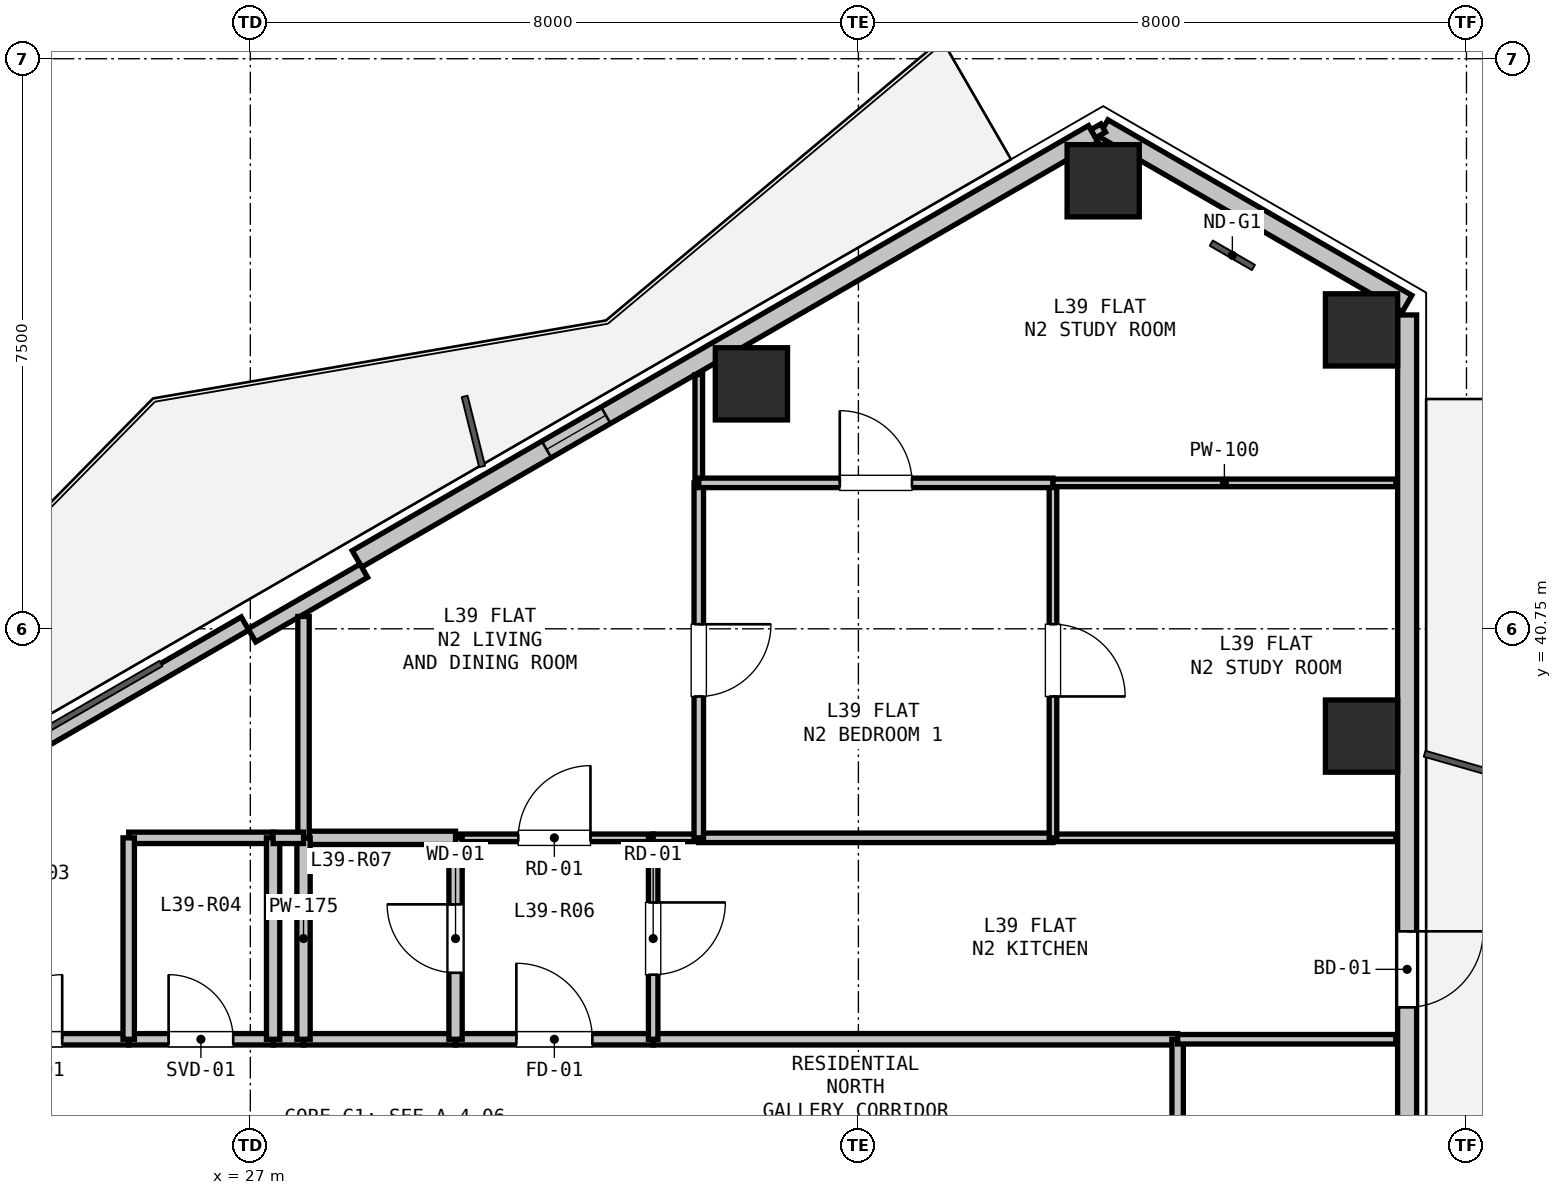
"""IFC4 building model, lengths in metres.
Left out: names, types, materials, properties, quantities, classifications, styles, units other than length and angle.
Written with IfcOpenShell. Run it as: python <this file> out.ifc"""

import sys

from ifc_helpers import new_model, si_unit, direction, frame, frame_2d, origin, origin_2d, place, context, subcontext, project, spatial, rectangle, hollow_rectangle, extrude, element, fill, save


model = new_model("IFC4")
c1 = context("Model", 3, precision=1e-05, world=origin(), true_north=direction((0.0, 1.0)))
c2 = subcontext(c1, "Body", "Model", "MODEL_VIEW")
j1 = project(units=[si_unit("LENGTHUNIT", "METRE"), si_unit("PLANEANGLEUNIT", "RADIAN")], contexts=[c1])
p1 = place(None, origin())
s1 = spatial("IfcSite", under=j1, at=p1, CompositionType="ELEMENT")
p2 = place(p1, origin())
s2 = spatial("IfcBuilding", under=s1, at=p2, CompositionType="ELEMENT")
p3 = place(p2, frame((0.0, 0.0, 141.0)))
s3 = spatial("IfcBuildingStorey", under=s2, at=p3, CompositionType="ELEMENT", Elevation=141.0)
for number, where, z_axis, x_axis in (
    (1, (33.593, 43.973, 0.0), (0.0, 0.0, 1.0), (1.0, 0.0, 0.0)),
    (2, (38.22, 46.645, 0.0), (0.0, 0.0, 1.0), (1.0, 0.0, 0.0)),
    (3, (41.619, 44.683, 0.0), (0.0, 0.0, 1.0), (1.0, 0.0, 0.0)),
    (4, (41.619, 39.339, 0.0), (0.0, 0.0, 1.0), (1.0, 0.0, 0.0)),
):
    element("IfcColumn", number, at=place(p3, frame(where, z_axis=z_axis, x_axis=x_axis)), inside=s3, PredefinedType="COLUMN", context=c2, shape_type="SweptSolid", body=[
        extrude(hollow_rectangle(XDim=0.95, YDim=0.95, WallThickness=0.028, at=origin_2d()), origin(), (0.0, 0.0, 1.0), 3.3),
    ])
p4 = place(p3, frame((38.22, 47.338, 0.0), z_axis=(0.0, 0.0, 1.0), x_axis=(0.866035021055, -0.499983342029, 0.0)))
e5 = element("IfcWall", 5, at=p4, inside=s3, PredefinedType="SOLIDWALL", context=c2, shape_type="SweptSolid", body=[
    extrude(rectangle(XDim=4.617, YDim=0.25, at=frame_2d((2.309, 0.0))), origin(), (0.0, 0.0, 1.0), 2.68),
])
p5 = place(p3, frame((17.85, 35.577, 0.0), z_axis=(0.0, 0.0, 1.0), x_axis=(0.866026619769, 0.499997893847, 0.0)))
e6 = element("IfcWall", 6, at=p5, inside=s3, PredefinedType="PARAPET", context=c2, shape_type="SweptSolid", body=[
    extrude(rectangle(XDim=10.486, YDim=0.2, at=frame_2d((5.243, 0.0))), origin(), (0.0, 0.0, 1.0), 0.2),
])
p6 = place(p3, frame((28.403, 41.67, 0.0), z_axis=(0.0, 0.0, 1.0), x_axis=(0.86602239209, 0.500005216371, 0.0)))
e7 = element("IfcWall", 7, at=p6, inside=s3, PredefinedType="SOLIDWALL", context=c2, shape_type="SweptSolid", body=[
    extrude(rectangle(XDim=11.186, YDim=0.25, at=frame_2d((5.593, 0.0))), origin(), (0.0, 0.0, 1.0), 2.68),
])
p7 = place(p6, frame((2.88, 0.0, 0.9)))
e8 = element("IfcOpeningElement", 8, at=p7, cuts=e7, PredefinedType="OPENING", context=c2, shape_type="SweptSolid", body=[
    extrude(rectangle(XDim=0.9, YDim=1.4, at=frame_2d((0.45, 0.7))), frame((0.0, 0.135, 0.0), z_axis=(0.0, -1.0, 0.0), x_axis=(1.0, 0.0, 0.0)), (0.0, 0.0, 1.0), 0.27),
])
p8 = place(p3, frame((27.021, 40.664, 0.0), z_axis=(0.0, 0.0, 1.0), x_axis=(0.86605165483, 0.499954529098, 0.0)))
e9 = element("IfcWall", 9, at=p8, inside=s3, PredefinedType="PARAPET", context=c2, shape_type="SweptSolid", body=[
    extrude(rectangle(XDim=1.7, YDim=0.2, at=frame_2d((0.85, 0.0))), origin(), (0.0, 0.0, 1.0), 2.68),
])
p9 = place(p3, frame((42.219, 44.879, 0.0), z_axis=(0.0, 0.0, 1.0), x_axis=(0.0, -1.0, 0.0)))
e10 = element("IfcWall", 10, at=p9, inside=s3, PredefinedType="SOLIDWALL", context=c2, shape_type="SweptSolid", body=[
    extrude(rectangle(XDim=11.186, YDim=0.25, at=frame_2d((5.593, 0.0))), origin(), (0.0, 0.0, 1.0), 2.68),
])
p10 = place(p9, frame((8.109, 0.0, 0.0)))
e11 = element("IfcOpeningElement", 11, at=p10, cuts=e10, PredefinedType="OPENING", context=c2, shape_type="SweptSolid", body=[
    extrude(rectangle(XDim=1.0, YDim=2.1, at=frame_2d((0.5, 1.05))), frame((0.0, 0.135, 0.0), z_axis=(0.0, -1.0, 0.0), x_axis=(1.0, 0.0, 0.0)), (0.0, 0.0, 1.0), 0.27),
])
p11 = place(p3, frame((22.8, 35.35, 0.0), z_axis=(0.0, 0.0, 1.0), x_axis=(1.0, 0.0, 0.0)))
e12 = element("IfcWall", 12, at=p11, inside=s3, PredefinedType="PARTITIONING", context=c2, shape_type="SweptSolid", body=[
    extrude(rectangle(XDim=2.6, YDim=0.15, at=frame_2d((1.3, 0.0))), origin(), (0.0, 0.0, 1.0), 3.06),
])
p12 = place(p11, frame((0.875, 0.0, 0.0)))
e13 = element("IfcOpeningElement", 13, at=p12, cuts=e12, PredefinedType="OPENING", context=c2, shape_type="SweptSolid", body=[
    extrude(rectangle(XDim=0.85, YDim=2.1, at=frame_2d((0.425, 1.05))), frame((0.0, 0.085, 0.0), z_axis=(0.0, -1.0, 0.0), x_axis=(1.0, 0.0, 0.0)), (0.0, 0.0, 1.0), 0.17),
])
p13 = place(p3, frame((25.4, 35.35, 0.0), z_axis=(0.0, 0.0, 1.0), x_axis=(1.0, 0.0, 0.0)))
e14 = element("IfcWall", 14, at=p13, inside=s3, PredefinedType="PARTITIONING", context=c2, shape_type="SweptSolid", body=[
    extrude(rectangle(XDim=1.9, YDim=0.15, at=frame_2d((0.95, 0.0))), origin(), (0.0, 0.0, 1.0), 3.06),
])
p14 = place(p13, frame((0.525, 0.0, 0.0)))
e15 = element("IfcOpeningElement", 15, at=p14, cuts=e14, PredefinedType="OPENING", context=c2, shape_type="SweptSolid", body=[
    extrude(rectangle(XDim=0.85, YDim=2.1, at=frame_2d((0.425, 1.05))), frame((0.0, 0.085, 0.0), z_axis=(0.0, -1.0, 0.0), x_axis=(1.0, 0.0, 0.0)), (0.0, 0.0, 1.0), 0.17),
])
p15 = place(p3, frame((27.3, 35.35, 0.0), z_axis=(0.0, 0.0, 1.0), x_axis=(1.0, 0.0, 0.0)))
e16 = element("IfcWall", 16, at=p15, inside=s3, PredefinedType="PARTITIONING", context=c2, shape_type="SweptSolid", body=[
    extrude(rectangle(XDim=0.4, YDim=0.15, at=frame_2d((0.2, 0.0))), origin(), (0.0, 0.0, 1.0), 3.06),
])
p16 = place(p3, frame((27.7, 35.35, 0.0), z_axis=(0.0, 0.0, 1.0), x_axis=(1.0, 0.0, 0.0)))
e17 = element("IfcWall", 17, at=p16, inside=s3, PredefinedType="PARTITIONING", context=c2, shape_type="SweptSolid", body=[
    extrude(rectangle(XDim=2.0, YDim=0.15, at=frame_2d((1.0, 0.0))), origin(), (0.0, 0.0, 1.0), 3.06),
])
p17 = place(p3, frame((29.7, 35.35, 0.0), z_axis=(0.0, 0.0, 1.0), x_axis=(1.0, 0.0, 0.0)))
e18 = element("IfcWall", 18, at=p17, inside=s3, PredefinedType="PARTITIONING", context=c2, shape_type="SweptSolid", body=[
    extrude(rectangle(XDim=2.6, YDim=0.15, at=frame_2d((1.3, 0.0))), origin(), (0.0, 0.0, 1.0), 3.06),
])
p18 = place(p17, frame((0.8, 0.0, 0.0)))
e19 = element("IfcOpeningElement", 19, at=p18, cuts=e18, PredefinedType="OPENING", context=c2, shape_type="SweptSolid", body=[
    extrude(rectangle(XDim=1.0, YDim=2.15, at=frame_2d((0.5, 1.075))), frame((0.0, 0.085, 0.0), z_axis=(0.0, -1.0, 0.0), x_axis=(1.0, 0.0, 0.0)), (0.0, 0.0, 1.0), 0.17),
])
p19 = place(p3, frame((32.3, 35.35, 0.0), z_axis=(0.0, 0.0, 1.0), x_axis=(1.0, 0.0, 0.0)))
e20 = element("IfcWall", 20, at=p19, inside=s3, PredefinedType="PARTITIONING", context=c2, shape_type="SweptSolid", body=[
    extrude(rectangle(XDim=6.9, YDim=0.15, at=frame_2d((3.45, 0.0))), origin(), (0.0, 0.0, 1.0), 2.433),
])
p20 = place(p3, frame((39.2, 35.35, 0.0), z_axis=(0.0, 0.0, 1.0), x_axis=(0.0, -1.0, 0.0)))
e21 = element("IfcWall", 21, at=p20, inside=s3, PredefinedType="PARTITIONING", context=c2, shape_type="SweptSolid", body=[
    extrude(rectangle(XDim=1.75, YDim=0.15, at=frame_2d((0.875, 0.0))), origin(), (0.0, 0.0, 1.0), 3.06),
])
p21 = place(p3, frame((29.7, 38.0, 0.0), z_axis=(0.0, 0.0, 1.0), x_axis=(1.0, 0.0, 0.0)))
e22 = element("IfcWall", 22, at=p21, inside=s3, PredefinedType="PARTITIONING", context=c2, shape_type="SweptSolid", body=[
    extrude(rectangle(XDim=2.6, YDim=0.1, at=frame_2d((1.3, 0.0))), origin(), (0.0, 0.0, 1.0), 3.06),
])
p22 = place(p21, frame((0.825, 0.0, 0.0)))
e23 = element("IfcOpeningElement", 23, at=p22, cuts=e22, PredefinedType="OPENING", context=c2, shape_type="SweptSolid", body=[
    extrude(rectangle(XDim=0.95, YDim=2.1, at=frame_2d((0.475, 1.05))), frame((0.0, 0.06, 0.0), z_axis=(0.0, -1.0, 0.0), x_axis=(1.0, 0.0, 0.0)), (0.0, 0.0, 1.0), 0.12),
])
p23 = place(p3, frame((32.3, 38.0, 0.0), z_axis=(0.0, 0.0, 1.0), x_axis=(0.0, -1.0, 0.0)))
e24 = element("IfcWall", 24, at=p23, inside=s3, PredefinedType="PARTITIONING", context=c2, shape_type="SweptSolid", body=[
    extrude(rectangle(XDim=2.65, YDim=0.125, at=frame_2d((1.325, 0.0))), origin(), (0.0, 0.0, 1.0), 3.06),
])
p24 = place(p23, frame((0.85, 0.0, 0.0)))
e25 = element("IfcOpeningElement", 25, at=p24, cuts=e24, PredefinedType="OPENING", context=c2, shape_type="SweptSolid", body=[
    extrude(rectangle(XDim=0.95, YDim=2.1, at=frame_2d((0.475, 1.05))), frame((0.0, 0.073, 0.0), z_axis=(0.0, -1.0, 0.0), x_axis=(1.0, 0.0, 0.0)), (0.0, 0.0, 1.0), 0.145),
])
p25 = place(p3, frame((29.7, 35.35, 0.0), z_axis=(0.0, 0.0, 1.0), x_axis=(0.0, 1.0, 0.0)))
e26 = element("IfcWall", 26, at=p25, inside=s3, PredefinedType="PLUMBINGWALL", context=c2, shape_type="SweptSolid", body=[
    extrude(rectangle(XDim=2.65, YDim=0.175, at=frame_2d((1.325, 0.0))), origin(), (0.0, 0.0, 1.0), 3.06),
])
p26 = place(p25, frame((0.875, 0.0, 0.0)))
e27 = element("IfcOpeningElement", 27, at=p26, cuts=e26, PredefinedType="OPENING", context=c2, shape_type="SweptSolid", body=[
    extrude(rectangle(XDim=0.9, YDim=2.1, at=frame_2d((0.45, 1.05))), frame((0.0, 0.097, 0.0), z_axis=(0.0, -1.0, 0.0), x_axis=(1.0, 0.0, 0.0)), (0.0, 0.0, 1.0), 0.195),
])
p27 = place(p3, frame((25.4, 38.0, 0.0), z_axis=(0.0, 0.0, 1.0), x_axis=(1.0, 0.0, 0.0)))
e28 = element("IfcWall", 28, at=p27, inside=s3, PredefinedType="PARTITIONING", context=c2, shape_type="SweptSolid", body=[
    extrude(rectangle(XDim=1.9, YDim=0.15, at=frame_2d((0.95, 0.0))), origin(), (0.0, 0.0, 1.0), 3.06),
])
p28 = place(p3, frame((27.3, 38.0, 0.0), z_axis=(0.0, 0.0, 1.0), x_axis=(0.0, -1.0, 0.0)))
e29 = element("IfcWall", 29, at=p28, inside=s3, PredefinedType="PLUMBINGWALL", context=c2, shape_type="SweptSolid", body=[
    extrude(rectangle(XDim=2.65, YDim=0.175, at=frame_2d((1.325, 0.0))), origin(), (0.0, 0.0, 1.0), 3.06),
])
p29 = place(p3, frame((25.4, 35.35, 0.0), z_axis=(0.0, 0.0, 1.0), x_axis=(0.0, 1.0, 0.0)))
e30 = element("IfcWall", 30, at=p29, inside=s3, PredefinedType="PARTITIONING", context=c2, shape_type="SweptSolid", body=[
    extrude(rectangle(XDim=2.65, YDim=0.15, at=frame_2d((1.325, 0.0))), origin(), (0.0, 0.0, 1.0), 3.06),
])
p30 = place(p3, frame((27.7, 38.0, 0.0), z_axis=(0.0, 0.0, 1.0), x_axis=(1.0, 0.0, 0.0)))
e31 = element("IfcWall", 31, at=p30, inside=s3, PredefinedType="PLUMBINGWALL", context=c2, shape_type="SweptSolid", body=[
    extrude(rectangle(XDim=2.0, YDim=0.175, at=frame_2d((1.0, 0.0))), origin(), (0.0, 0.0, 1.0), 3.06),
])
p31 = place(p3, frame((27.7, 35.35, 0.0), z_axis=(0.0, 0.0, 1.0), x_axis=(0.0, 1.0, 0.0)))
e32 = element("IfcWall", 32, at=p31, inside=s3, PredefinedType="PLUMBINGWALL", context=c2, shape_type="SweptSolid", body=[
    extrude(rectangle(XDim=2.65, YDim=0.175, at=frame_2d((1.325, 0.0))), origin(), (0.0, 0.0, 1.0), 3.06),
])
p32 = place(p3, frame((42.07, 35.35, 0.0), z_axis=(0.0, 0.0, 1.0), x_axis=(-1.0, 0.0, 0.0)))
e33 = element("IfcWall", 33, at=p32, inside=s3, PredefinedType="PARTITIONING", context=c2, shape_type="SweptSolid", body=[
    extrude(rectangle(XDim=2.87, YDim=0.125, at=frame_2d((1.435, 0.0))), origin(), (0.0, 0.0, 1.0), 2.365),
])
p33 = place(p3, frame((32.3, 38.0, 0.0), z_axis=(0.0, 0.0, 1.0), x_axis=(1.0, 0.0, 0.0)))
e34 = element("IfcWall", 34, at=p33, inside=s3, PredefinedType="PARTITIONING", context=c2, shape_type="SweptSolid", body=[
    extrude(rectangle(XDim=0.6, YDim=0.1, at=frame_2d((0.3, 0.0))), origin(), (0.0, 0.0, 1.0), 3.06),
])
p34 = place(p3, frame((32.9, 38.0, 0.0), z_axis=(0.0, 0.0, 1.0), x_axis=(1.0, 0.0, 0.0)))
e35 = element("IfcWall", 35, at=p34, inside=s3, PredefinedType="PARTITIONING", context=c2, shape_type="SweptSolid", body=[
    extrude(rectangle(XDim=4.66, YDim=0.125, at=frame_2d((2.33, 0.0))), origin(), (0.0, 0.0, 1.0), 2.433),
])
p35 = place(p3, frame((37.56, 38.0, 0.0), z_axis=(0.0, 0.0, 1.0), x_axis=(1.0, 0.0, 0.0)))
e36 = element("IfcWall", 36, at=p35, inside=s3, PredefinedType="PARTITIONING", context=c2, shape_type="SweptSolid", body=[
    extrude(rectangle(XDim=4.51, YDim=0.1, at=frame_2d((2.255, 0.0))), origin(), (0.0, 0.0, 1.0), 2.365),
])
p36 = place(p3, frame((27.7, 40.913, 0.0), z_axis=(0.0, 0.0, 1.0), x_axis=(0.0, -1.0, 0.0)))
e37 = element("IfcWall", 37, at=p36, inside=s3, PredefinedType="PARTITIONING", context=c2, shape_type="SweptSolid", body=[
    extrude(rectangle(XDim=2.913, YDim=0.15, at=frame_2d((1.456, 0.0))), origin(), (0.0, 0.0, 1.0), 2.365),
])
p37 = place(p3, frame((27.7, 38.0, 0.0), z_axis=(0.0, 0.0, 1.0), x_axis=(-1.0, 0.0, 0.0)))
e38 = element("IfcWall", 38, at=p37, inside=s3, PredefinedType="PARTITIONING", context=c2, shape_type="SweptSolid", body=[
    extrude(rectangle(XDim=0.4, YDim=0.15, at=frame_2d((0.2, 0.0))), origin(), (0.0, 0.0, 1.0), 3.06),
])
p38 = place(p3, frame((32.9, 44.094, 0.0), z_axis=(0.0, 0.0, 1.0), x_axis=(0.0, -1.0, 0.0)))
e39 = element("IfcWall", 39, at=p38, inside=s3, PredefinedType="PARTITIONING", context=c2, shape_type="SweptSolid", body=[
    extrude(rectangle(XDim=1.424, YDim=0.1, at=frame_2d((0.712, 0.0))), origin(), (0.0, 0.0, 1.0), 2.365),
])
p39 = place(p3, frame((32.9, 42.67, 0.0), z_axis=(0.0, 0.0, 1.0), x_axis=(0.0, -1.0, 0.0)))
e40 = element("IfcWall", 40, at=p39, inside=s3, PredefinedType="PARTITIONING", context=c2, shape_type="SweptSolid", body=[
    extrude(rectangle(XDim=4.67, YDim=0.125, at=frame_2d((2.335, 0.0))), origin(), (0.0, 0.0, 1.0), 3.06),
])
p40 = place(p39, frame((1.86, 0.0, 0.0)))
e41 = element("IfcOpeningElement", 41, at=p40, cuts=e40, PredefinedType="OPENING", context=c2, shape_type="SweptSolid", body=[
    extrude(rectangle(XDim=0.95, YDim=2.1, at=frame_2d((0.475, 1.05))), frame((0.0, 0.073, 0.0), z_axis=(0.0, -1.0, 0.0), x_axis=(1.0, 0.0, 0.0)), (0.0, 0.0, 1.0), 0.145),
])
p41 = place(p3, frame((37.56, 42.67, 0.0), z_axis=(0.0, 0.0, 1.0), x_axis=(0.0, -1.0, 0.0)))
e42 = element("IfcWall", 42, at=p41, inside=s3, PredefinedType="PARTITIONING", context=c2, shape_type="SweptSolid", body=[
    extrude(rectangle(XDim=4.67, YDim=0.1, at=frame_2d((2.335, 0.0))), origin(), (0.0, 0.0, 1.0), 2.433),
])
p42 = place(p41, frame((1.86, 0.0, 0.0)))
e43 = element("IfcOpeningElement", 43, at=p42, cuts=e42, PredefinedType="OPENING", context=c2, shape_type="SweptSolid", body=[
    extrude(rectangle(XDim=0.95, YDim=2.1, at=frame_2d((0.475, 1.05))), frame((0.0, 0.06, 0.0), z_axis=(0.0, -1.0, 0.0), x_axis=(1.0, 0.0, 0.0)), (0.0, 0.0, 1.0), 0.12),
])
p43 = place(p3, frame((32.9, 42.67, 0.0), z_axis=(0.0, 0.0, 1.0), x_axis=(1.0, 0.0, 0.0)))
e44 = element("IfcWall", 44, at=p43, inside=s3, PredefinedType="PARTITIONING", context=c2, shape_type="SweptSolid", body=[
    extrude(rectangle(XDim=4.66, YDim=0.125, at=frame_2d((2.33, 0.0))), origin(), (0.0, 0.0, 1.0), 2.433),
])
p44 = place(p43, frame((1.855, 0.0, 0.0)))
e45 = element("IfcOpeningElement", 45, at=p44, cuts=e44, PredefinedType="OPENING", context=c2, shape_type="SweptSolid", body=[
    extrude(rectangle(XDim=0.95, YDim=2.1, at=frame_2d((0.475, 1.05))), frame((0.0, 0.073, 0.0), z_axis=(0.0, -1.0, 0.0), x_axis=(1.0, 0.0, 0.0)), (0.0, 0.0, 1.0), 0.145),
])
p45 = place(p3, frame((37.56, 42.67, 0.0), z_axis=(0.0, 0.0, 1.0), x_axis=(1.0, 0.0, 0.0)))
e46 = element("IfcWall", 46, at=p45, inside=s3, PredefinedType="PARTITIONING", context=c2, shape_type="SweptSolid", body=[
    extrude(rectangle(XDim=4.51, YDim=0.1, at=frame_2d((2.255, 0.0))), origin(), (0.0, 0.0, 1.0), 2.433),
])
p46 = place(p3, frame((38.091, 47.263, 0.0), z_axis=(0.0, 0.0, 1.0), x_axis=(0.865833797362, 0.500331725305, 0.0)))
e47 = element("IfcWall", 47, at=p46, inside=s3, PredefinedType="PARTITIONING", context=c2, shape_type="SweptSolid", body=[
    extrude(rectangle(XDim=0.15, YDim=0.125, at=frame_2d((0.075, 0.0))), origin(), (0.0, 0.0, 1.0), 3.06),
])
p47 = place(p7, origin())
e48 = element("IfcWindow", 48, at=p47, inside=s3, PartitioningType="SINGLE_PANEL", PredefinedType="WINDOW", context=c2, shape_type="SweptSolid", body=[
    extrude(rectangle(XDim=0.9, YDim=1.4, at=frame_2d((0.45, 0.7))), frame((0.0, 0.03, 0.0), z_axis=(0.0, -1.0, 0.0), x_axis=(1.0, 0.0, 0.0)), (0.0, 0.0, 1.0), 0.06),
])
fill(e8, e48)
p48 = place(p10, origin())
e49 = element("IfcDoor", 49, at=p48, inside=s3, OperationType="SINGLE_SWING_LEFT", PredefinedType="DOOR", context=c2, shape_type="SweptSolid", body=[
    extrude(rectangle(XDim=1.0, YDim=2.1, at=frame_2d((0.5, 1.05))), frame((0.0, 0.025, 0.0), z_axis=(0.0, -1.0, 0.0), x_axis=(1.0, 0.0, 0.0)), (0.0, 0.0, 1.0), 0.05),
])
fill(e11, e49)
p49 = place(p18, origin())
e50 = element("IfcDoor", 50, at=p49, inside=s3, OperationType="SINGLE_SWING_LEFT", PredefinedType="DOOR", context=c2, shape_type="SweptSolid", body=[
    extrude(rectangle(XDim=1.0, YDim=2.15, at=frame_2d((0.5, 1.075))), frame((0.0, 0.025, 0.0), z_axis=(0.0, -1.0, 0.0), x_axis=(1.0, 0.0, 0.0)), (0.0, 0.0, 1.0), 0.05),
])
fill(e19, e50)
p50 = place(p14, origin())
e51 = element("IfcDoor", 51, at=p50, inside=s3, OperationType="SINGLE_SWING_LEFT", PredefinedType="DOOR", context=c2, shape_type="SweptSolid", body=[
    extrude(rectangle(XDim=0.85, YDim=2.1, at=frame_2d((0.425, 1.05))), frame((0.0, 0.025, 0.0), z_axis=(0.0, -1.0, 0.0), x_axis=(1.0, 0.0, 0.0)), (0.0, 0.0, 1.0), 0.05),
])
fill(e15, e51)
p51 = place(p12, origin())
e52 = element("IfcDoor", 52, at=p51, inside=s3, OperationType="SINGLE_SWING_RIGHT", PredefinedType="DOOR", context=c2, shape_type="SweptSolid", body=[
    extrude(rectangle(XDim=0.85, YDim=2.1, at=frame_2d((0.425, 1.05))), frame((0.0, 0.025, 0.0), z_axis=(0.0, -1.0, 0.0), x_axis=(1.0, 0.0, 0.0)), (0.0, 0.0, 1.0), 0.05),
])
fill(e13, e52)
p52 = place(p26, origin())
e53 = element("IfcDoor", 53, at=p52, inside=s3, OperationType="SINGLE_SWING_RIGHT", PredefinedType="DOOR", context=c2, shape_type="SweptSolid", body=[
    extrude(rectangle(XDim=0.9, YDim=2.1, at=frame_2d((0.45, 1.05))), frame((0.0, 0.025, 0.0), z_axis=(0.0, -1.0, 0.0), x_axis=(1.0, 0.0, 0.0)), (0.0, 0.0, 1.0), 0.05),
])
fill(e27, e53)
p53 = place(p24, origin())
e54 = element("IfcDoor", 54, at=p53, inside=s3, OperationType="SINGLE_SWING_LEFT", PredefinedType="DOOR", context=c2, shape_type="SweptSolid", body=[
    extrude(rectangle(XDim=0.95, YDim=2.1, at=frame_2d((0.475, 1.05))), frame((0.0, 0.025, 0.0), z_axis=(0.0, -1.0, 0.0), x_axis=(1.0, 0.0, 0.0)), (0.0, 0.0, 1.0), 0.05),
])
fill(e25, e54)
p54 = place(p22, origin())
e55 = element("IfcDoor", 55, at=p54, inside=s3, OperationType="SINGLE_SWING_RIGHT", PredefinedType="DOOR", context=c2, shape_type="SweptSolid", body=[
    extrude(rectangle(XDim=0.95, YDim=2.1, at=frame_2d((0.475, 1.05))), frame((0.0, 0.025, 0.0), z_axis=(0.0, -1.0, 0.0), x_axis=(1.0, 0.0, 0.0)), (0.0, 0.0, 1.0), 0.05),
])
fill(e23, e55)
p55 = place(p40, origin())
e56 = element("IfcDoor", 56, at=p55, inside=s3, OperationType="SINGLE_SWING_LEFT", PredefinedType="DOOR", context=c2, shape_type="SweptSolid", body=[
    extrude(rectangle(XDim=0.95, YDim=2.1, at=frame_2d((0.475, 1.05))), frame((0.0, 0.025, 0.0), z_axis=(0.0, -1.0, 0.0), x_axis=(1.0, 0.0, 0.0)), (0.0, 0.0, 1.0), 0.05),
])
fill(e41, e56)
p56 = place(p42, origin())
e57 = element("IfcDoor", 57, at=p56, inside=s3, OperationType="SINGLE_SWING_RIGHT", PredefinedType="DOOR", context=c2, shape_type="SweptSolid", body=[
    extrude(rectangle(XDim=0.95, YDim=2.1, at=frame_2d((0.475, 1.05))), frame((0.0, 0.025, 0.0), z_axis=(0.0, -1.0, 0.0), x_axis=(1.0, 0.0, 0.0)), (0.0, 0.0, 1.0), 0.05),
])
fill(e43, e57)
p57 = place(p44, origin())
e58 = element("IfcDoor", 58, at=p57, inside=s3, OperationType="SINGLE_SWING_LEFT", PredefinedType="DOOR", context=c2, shape_type="SweptSolid", body=[
    extrude(rectangle(XDim=0.95, YDim=2.1, at=frame_2d((0.475, 1.05))), frame((0.0, 0.025, 0.0), z_axis=(0.0, -1.0, 0.0), x_axis=(1.0, 0.0, 0.0)), (0.0, 0.0, 1.0), 0.05),
])
fill(e45, e58)
save(model, sys.argv[1])
